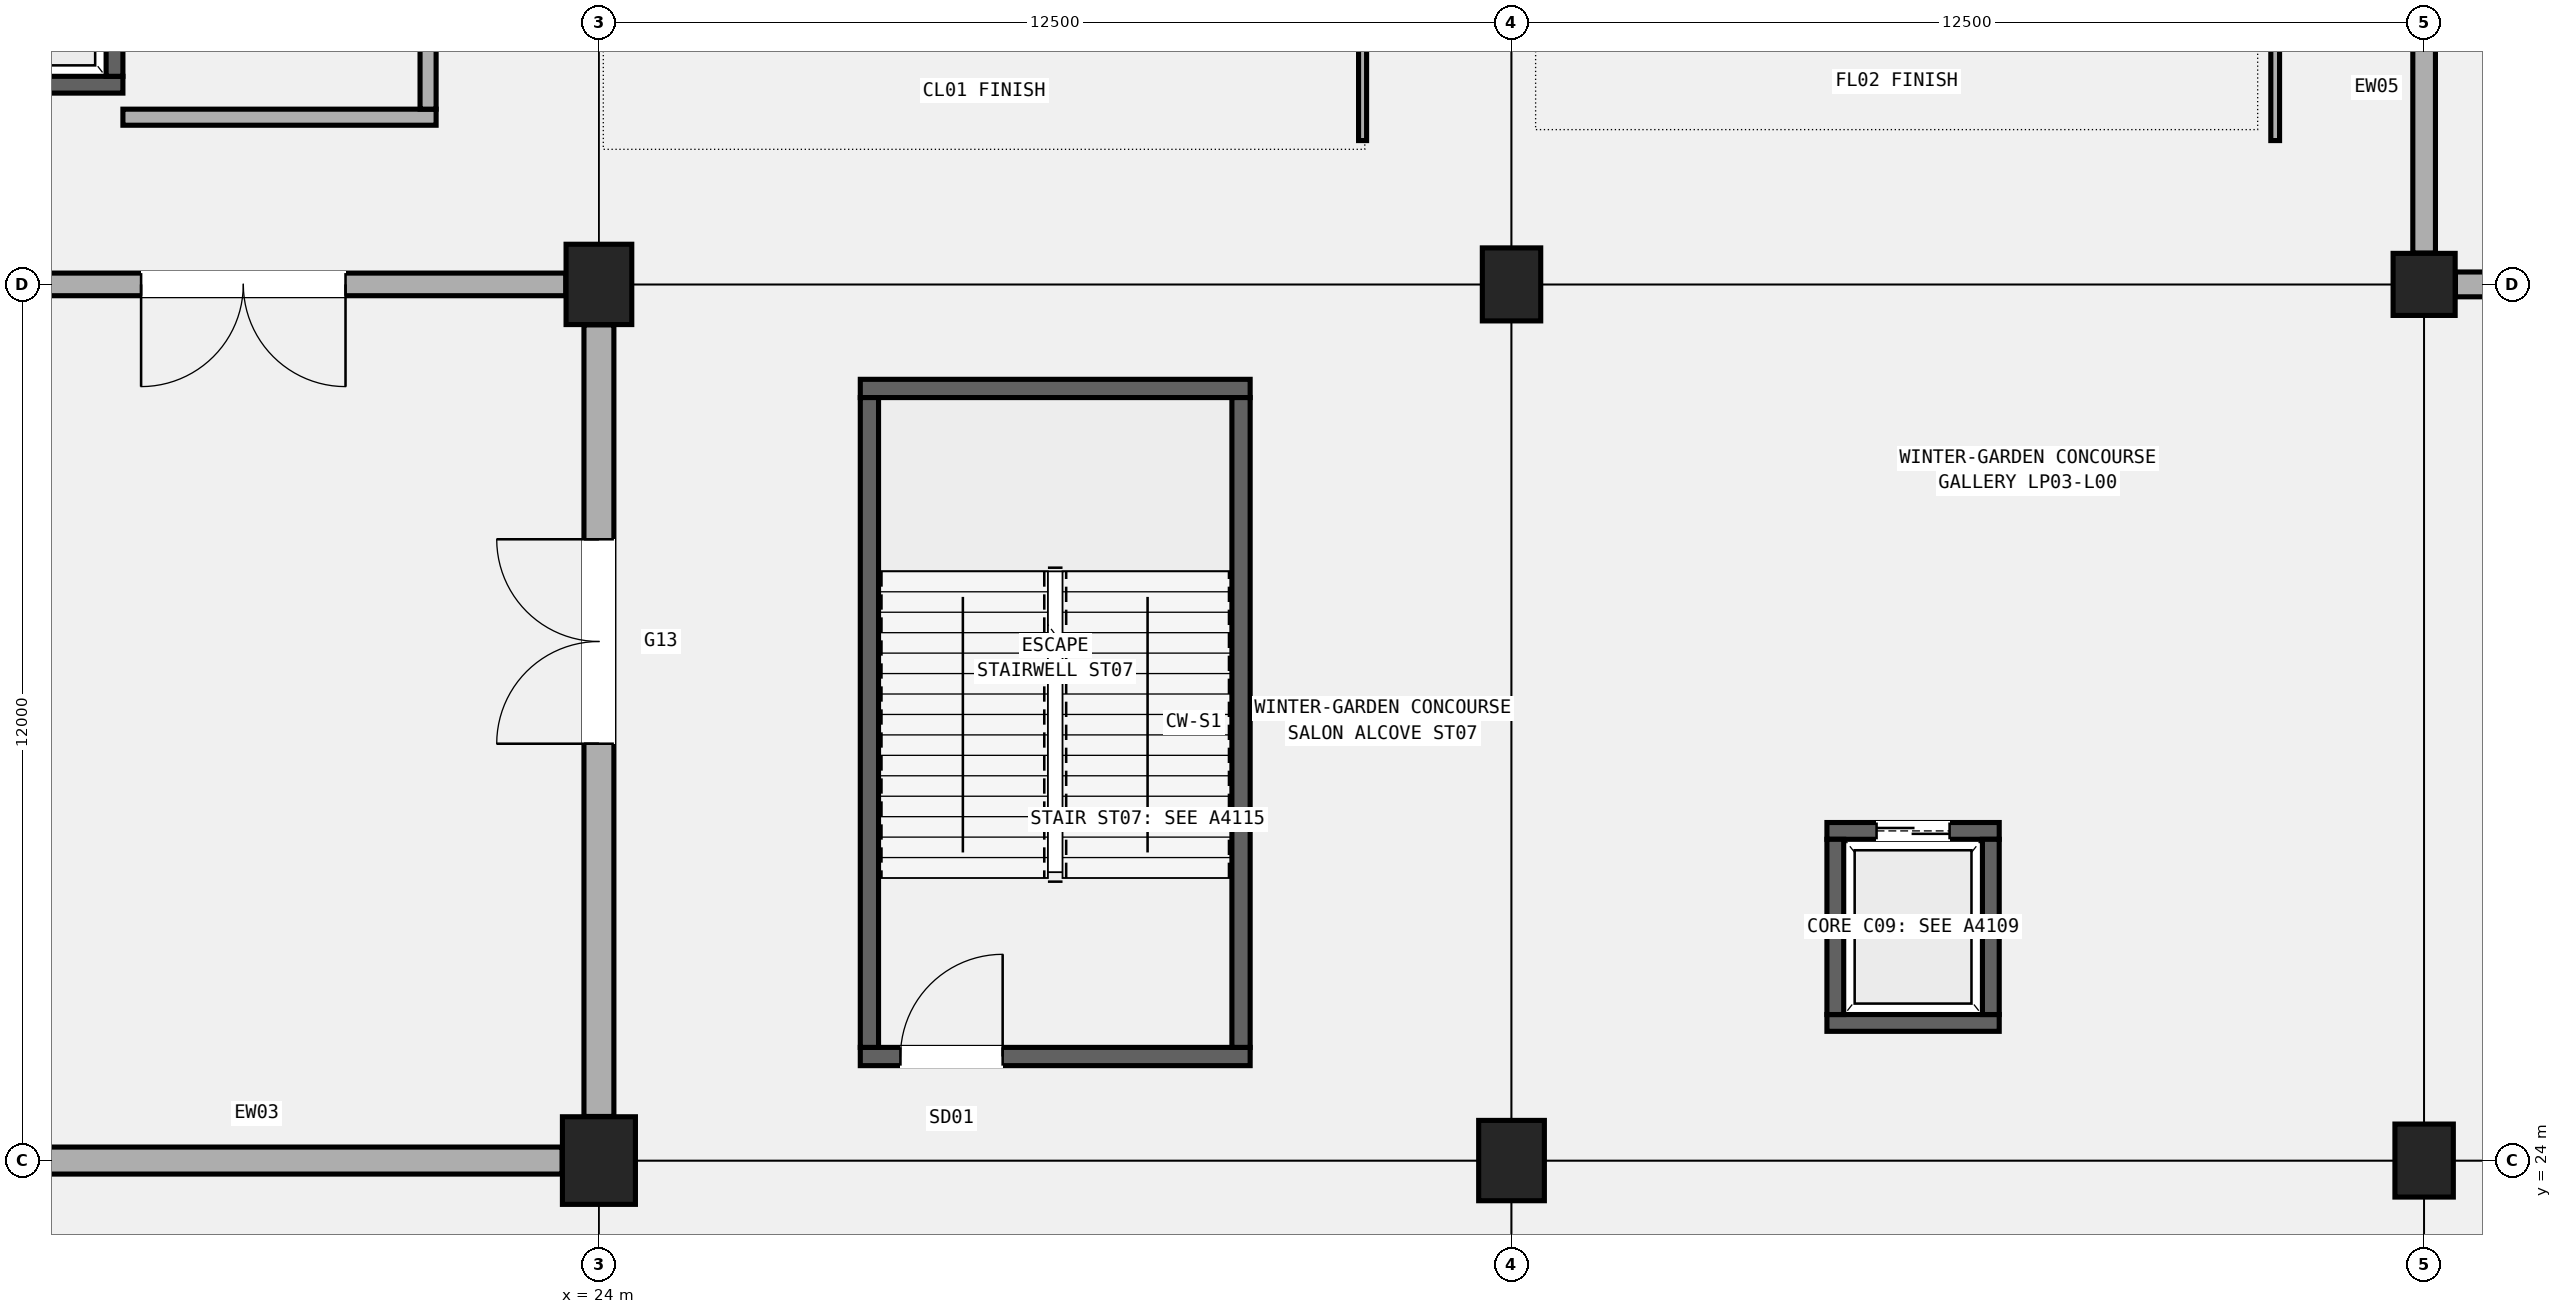
"""IFC4 building model, lengths in metres.
Left out: names, types, materials, properties, quantities, classifications, styles, units other than length and angle.
Written with IfcOpenShell. Run it as: python <this file> out.ifc"""

import sys

from ifc_helpers import new_model, si_unit, direction, frame, frame_2d, origin, origin_2d, place, context, subcontext, project, spatial, rectangle, circle, extrude, element, fill, save


model = new_model("IFC4")
c1 = context("Model", 3, precision=1e-05, world=origin(), true_north=direction((0.0, 1.0)))
c2 = subcontext(c1, "Body", "Model", "MODEL_VIEW")
j1 = project(units=[si_unit("LENGTHUNIT", "METRE"), si_unit("PLANEANGLEUNIT", "RADIAN")], contexts=[c1])
p1 = place(None, origin())
s1 = spatial("IfcSite", under=j1, at=p1, CompositionType="ELEMENT")
p2 = place(p1, origin())
s2 = spatial("IfcBuilding", under=s1, at=p2, CompositionType="ELEMENT")
p3 = place(p2, origin())
s3 = spatial("IfcBuildingStorey", under=s2, at=p3, CompositionType="ELEMENT", Elevation=0.0)
p4 = place(p3, frame((24.0, 24.0, 0.0), z_axis=(0.0, 0.0, 1.0), x_axis=(1.0, 0.0, 0.0)))
e1 = element("IfcColumn", 1, at=p4, inside=s3, PredefinedType="COLUMN", context=c2, shape_type="SweptSolid", body=[
    extrude(rectangle(XDim=1.0, YDim=1.2, at=origin_2d()), origin(), (0.0, 0.0, 1.0), 5.4),
])
for number, where, z_axis, x_axis in (
    (2, (24.0, 36.0, 0.0), (0.0, 0.0, 1.0), (1.0, 0.0, 0.0)),
    (3, (36.5, 24.0, 0.0), (0.0, 0.0, 1.0), (1.0, 0.0, 0.0)),
):
    element("IfcColumn", number, at=place(p3, frame(where, z_axis=z_axis, x_axis=x_axis)), inside=s3, PredefinedType="COLUMN", context=c2, shape_type="SweptSolid", body=[
        extrude(rectangle(XDim=0.9, YDim=1.1, at=origin_2d()), origin(), (0.0, 0.0, 1.0), 5.4),
    ])
for number, where, z_axis, x_axis in (
    (4, (36.5, 36.0, 0.0), (0.0, 0.0, 1.0), (1.0, 0.0, 0.0)),
    (5, (49.0, 24.0, 0.0), (0.0, 0.0, 1.0), (1.0, 0.0, 0.0)),
):
    element("IfcColumn", number, at=place(p3, frame(where, z_axis=z_axis, x_axis=x_axis)), inside=s3, PredefinedType="COLUMN", context=c2, shape_type="SweptSolid", body=[
        extrude(rectangle(XDim=0.8, YDim=1.0, at=origin_2d()), origin(), (0.0, 0.0, 1.0), 5.4),
    ])
p5 = place(p3, frame((49.0, 36.0, 0.0), z_axis=(0.0, 0.0, 1.0), x_axis=(1.0, 0.0, 0.0)))
e6 = element("IfcColumn", 6, at=p5, inside=s3, PredefinedType="COLUMN", context=c2, shape_type="SweptSolid", body=[
    extrude(circle(Radius=0.425, at=origin_2d()), origin(), (0.0, 0.0, 1.0), 5.4),
])
p6 = place(p3, frame((12.429, 24.0, 0.0), z_axis=(0.0, 0.0, 1.0), x_axis=(1.0, 0.0, 0.0)))
e7 = element("IfcWall", 7, at=p6, inside=s3, PredefinedType="SOLIDWALL", context=c2, shape_type="SweptSolid", body=[
    extrude(rectangle(XDim=11.067, YDim=0.37, at=frame_2d((5.534, 0.0))), origin(), (0.0, 0.0, 1.0), 4.34),
])
p7 = place(p6, frame((1.5, 0.0, 0.95)))
e8 = element("IfcOpeningElement", 8, at=p7, cuts=e7, PredefinedType="OPENING", context=c2, shape_type="SweptSolid", body=[
    extrude(rectangle(XDim=0.9, YDim=2.7, at=frame_2d((0.45, 1.35))), frame((0.0, 0.195, 0.0), z_axis=(0.0, -1.0, 0.0), x_axis=(1.0, 0.0, 0.0)), (0.0, 0.0, 1.0), 0.39),
])
p8 = place(p3, frame((12.504, 36.0, 0.0), z_axis=(0.0, 0.0, 1.0), x_axis=(1.0, 0.0, 0.0)))
e9 = element("IfcWall", 9, at=p8, inside=s3, PredefinedType="SOLIDWALL", context=c2, shape_type="SweptSolid", body=[
    extrude(rectangle(XDim=11.042, YDim=0.31, at=frame_2d((5.521, 0.0))), origin(), (0.0, 0.0, 1.0), 4.09),
])
p9 = place(p8, frame((8.025, 0.0, 0.0), z_axis=(0.0, 0.0, 1.0), x_axis=(-1.0, 0.0, 0.0)))
e10 = element("IfcOpeningElement", 10, at=p9, cuts=e9, PredefinedType="OPENING", context=c2, shape_type="SweptSolid", body=[
    extrude(rectangle(XDim=2.8, YDim=2.4, at=frame_2d((1.4, 1.2))), frame((0.0, 0.165, 0.0), z_axis=(0.0, -1.0, 0.0), x_axis=(1.0, 0.0, 0.0)), (0.0, 0.0, 1.0), 0.33),
])
p10 = place(p3, frame((24.0, 24.604, 0.0), z_axis=(0.0, 0.0, 1.0), x_axis=(0.0, 1.0, 0.0)))
e11 = element("IfcWall", 11, at=p10, inside=s3, PredefinedType="SOLIDWALL", context=c2, shape_type="SweptSolid", body=[
    extrude(rectangle(XDim=10.842, YDim=0.41, at=frame_2d((5.421, 0.0))), origin(), (0.0, 0.0, 1.0), 4.34),
])
p11 = place(p10, frame((5.105, 0.0, 0.0)))
e12 = element("IfcOpeningElement", 12, at=p11, cuts=e11, PredefinedType="OPENING", context=c2, shape_type="SweptSolid", body=[
    extrude(rectangle(XDim=2.8, YDim=2.4, at=frame_2d((1.4, 1.2))), frame((0.0, 0.215, 0.0), z_axis=(0.0, -1.0, 0.0), x_axis=(1.0, 0.0, 0.0)), (0.0, 0.0, 1.0), 0.43),
])
p12 = place(p3, frame((49.0, 36.429, 0.0), z_axis=(0.0, 0.0, 1.0), x_axis=(0.0, 1.0, 0.0)))
e13 = element("IfcWall", 13, at=p12, inside=s3, PredefinedType="SOLIDWALL", context=c2, shape_type="SweptSolid", body=[
    extrude(rectangle(XDim=10.967, YDim=0.31, at=frame_2d((5.483, 0.0))), origin(), (0.0, 0.0, 1.0), 4.34),
])
p13 = place(p12, frame((7.442, 0.0, 0.0), z_axis=(0.0, 0.0, 1.0), x_axis=(-1.0, 0.0, 0.0)))
e14 = element("IfcOpeningElement", 14, at=p13, cuts=e13, PredefinedType="OPENING", context=c2, shape_type="SweptSolid", body=[
    extrude(rectangle(XDim=2.6, YDim=2.5, at=frame_2d((1.3, 1.25))), frame((0.0, 0.165, 0.0), z_axis=(0.0, -1.0, 0.0), x_axis=(1.0, 0.0, 0.0)), (0.0, 0.0, 1.0), 0.33),
])
p14 = place(p3, frame((49.429, 36.0, 0.0), z_axis=(0.0, 0.0, 1.0), x_axis=(1.0, 0.0, 0.0)))
e15 = element("IfcWall", 15, at=p14, inside=s3, PredefinedType="SOLIDWALL", context=c2, shape_type="SweptSolid", body=[
    extrude(rectangle(XDim=11.567, YDim=0.34, at=frame_2d((5.784, 0.0))), origin(), (0.0, 0.0, 1.0), 4.34),
])
p15 = place(p14, frame((5.177, 0.0, 0.0)))
e16 = element("IfcOpeningElement", 16, at=p15, cuts=e15, PredefinedType="OPENING", context=c2, shape_type="SweptSolid", body=[
    extrude(rectangle(XDim=2.6, YDim=2.5, at=frame_2d((1.3, 1.25))), frame((0.0, 0.18, 0.0), z_axis=(0.0, -1.0, 0.0), x_axis=(1.0, 0.0, 0.0)), (0.0, 0.0, 1.0), 0.36),
])
p16 = place(p3, frame((27.58, 25.425, 0.0), z_axis=(0.0, 0.0, 1.0), x_axis=(1.0, 0.0, 0.0)))
e17 = element("IfcWall", 17, at=p16, inside=s3, PredefinedType="SHEAR", context=c2, shape_type="SweptSolid", body=[
    extrude(rectangle(XDim=5.34, YDim=0.25, at=frame_2d((2.67, 0.0))), origin(), (0.0, 0.0, 1.0), 5.14),
])
p17 = place(p16, frame((0.55, 0.0, 0.0)))
e18 = element("IfcOpeningElement", 18, at=p17, cuts=e17, PredefinedType="OPENING", context=c2, shape_type="SweptSolid", body=[
    extrude(rectangle(XDim=1.4, YDim=2.15, at=frame_2d((0.7, 1.075))), frame((0.0, 0.135, 0.0), z_axis=(0.0, -1.0, 0.0), x_axis=(1.0, 0.0, 0.0)), (0.0, 0.0, 1.0), 0.27),
])
p18 = place(p3, frame((27.58, 34.575, 0.0), z_axis=(0.0, 0.0, 1.0), x_axis=(1.0, 0.0, 0.0)))
e19 = element("IfcWall", 19, at=p18, inside=s3, PredefinedType="SHEAR", context=c2, shape_type="SweptSolid", body=[
    extrude(rectangle(XDim=5.34, YDim=0.25, at=frame_2d((2.67, 0.0))), origin(), (0.0, 0.0, 1.0), 5.14),
])
for number, where, z_axis, x_axis in (
    (20, (27.705, 25.55, 0.0), (0.0, 0.0, 1.0), (0.0, 1.0, 0.0)),
    (21, (32.795, 25.55, 0.0), (0.0, 0.0, 1.0), (0.0, 1.0, 0.0)),
):
    element("IfcWall", number, at=place(p3, frame(where, z_axis=z_axis, x_axis=x_axis)), inside=s3, PredefinedType="SHEAR", context=c2, shape_type="SweptSolid", body=[
        extrude(rectangle(XDim=8.9, YDim=0.25, at=frame_2d((4.45, 0.0))), origin(), (0.0, 0.0, 1.0), 5.14),
    ])
p19 = place(p3, frame((14.92, 38.735, 0.0), z_axis=(0.0, 0.0, 1.0), x_axis=(1.0, 0.0, 0.0)))
e22 = element("IfcWall", 22, at=p19, inside=s3, PredefinedType="SHEAR", context=c2, shape_type="SweptSolid", body=[
    extrude(rectangle(XDim=2.56, YDim=0.23, at=frame_2d((1.28, 0.0))), origin(), (0.0, 0.0, 1.0), 5.14),
])
p20 = place(p3, frame((17.365, 38.85, 0.0), z_axis=(0.0, 0.0, 1.0), x_axis=(0.0, 1.0, 0.0)))
e23 = element("IfcWall", 23, at=p20, inside=s3, PredefinedType="SHEAR", context=c2, shape_type="SweptSolid", body=[
    extrude(rectangle(XDim=2.7, YDim=0.23, at=frame_2d((1.35, 0.0))), origin(), (0.0, 0.0, 1.0), 5.14),
])
p21 = place(p20, frame((0.8, 0.0, 0.0)))
e24 = element("IfcOpeningElement", 24, at=p21, cuts=e23, PredefinedType="OPENING", context=c2, shape_type="SweptSolid", body=[
    extrude(rectangle(XDim=1.1, YDim=2.15, at=frame_2d((0.55, 1.075))), frame((0.0, 0.125, 0.0), z_axis=(0.0, -1.0, 0.0), x_axis=(1.0, 0.0, 0.0)), (0.0, 0.0, 1.0), 0.25),
])
p22 = place(p3, frame((17.48, 38.29, 0.0), z_axis=(0.0, 0.0, 1.0), x_axis=(1.0, 0.0, 0.0)))
e25 = element("IfcWall", 25, at=p22, inside=s3, PredefinedType="SOLIDWALL", context=c2, shape_type="SweptSolid", body=[
    extrude(rectangle(XDim=4.29, YDim=0.22, at=frame_2d((2.145, 0.0))), origin(), (0.0, 0.0, 1.0), 4.52),
])
p23 = place(p3, frame((21.66, 38.4, 0.0), z_axis=(0.0, 0.0, 1.0), x_axis=(0.0, 1.0, 0.0)))
e26 = element("IfcWall", 26, at=p23, inside=s3, PredefinedType="SOLIDWALL", context=c2, shape_type="SweptSolid", body=[
    extrude(rectangle(XDim=3.6, YDim=0.22, at=frame_2d((1.8, 0.0))), origin(), (0.0, 0.0, 1.0), 4.52),
])
p24 = place(p23, frame((1.15, 0.0, 0.0)))
e27 = element("IfcOpeningElement", 27, at=p24, cuts=e26, PredefinedType="OPENING", context=c2, shape_type="SweptSolid", body=[
    extrude(rectangle(XDim=1.3, YDim=2.15, at=frame_2d((0.65, 1.075))), frame((0.0, 0.12, 0.0), z_axis=(0.0, -1.0, 0.0), x_axis=(1.0, 0.0, 0.0)), (0.0, 0.0, 1.0), 0.24),
])
p25 = place(p3, frame((40.82, 25.885, 0.0), z_axis=(0.0, 0.0, 1.0), x_axis=(1.0, 0.0, 0.0)))
e28 = element("IfcWall", 28, at=p25, inside=s3, PredefinedType="SHEAR", context=c2, shape_type="SweptSolid", body=[
    extrude(rectangle(XDim=2.36, YDim=0.23, at=frame_2d((1.18, 0.0))), origin(), (0.0, 0.0, 1.0), 5.14),
])
p26 = place(p3, frame((40.82, 28.515, 0.0), z_axis=(0.0, 0.0, 1.0), x_axis=(1.0, 0.0, 0.0)))
e29 = element("IfcWall", 29, at=p26, inside=s3, PredefinedType="SHEAR", context=c2, shape_type="SweptSolid", body=[
    extrude(rectangle(XDim=2.36, YDim=0.23, at=frame_2d((1.18, 0.0))), origin(), (0.0, 0.0, 1.0), 5.14),
])
p27 = place(p26, frame((0.68, 0.0, 0.0)))
e30 = element("IfcOpeningElement", 30, at=p27, cuts=e29, PredefinedType="OPENING", context=c2, shape_type="SweptSolid", body=[
    extrude(rectangle(XDim=1.0, YDim=2.15, at=frame_2d((0.5, 1.075))), frame((0.0, 0.125, 0.0), z_axis=(0.0, -1.0, 0.0), x_axis=(1.0, 0.0, 0.0)), (0.0, 0.0, 1.0), 0.25),
])
for number, where, z_axis, x_axis in (
    (31, (40.935, 26.0, 0.0), (0.0, 0.0, 1.0), (0.0, 1.0, 0.0)),
    (32, (43.065, 26.0, 0.0), (0.0, 0.0, 1.0), (0.0, 1.0, 0.0)),
):
    element("IfcWall", number, at=place(p3, frame(where, z_axis=z_axis, x_axis=x_axis)), inside=s3, PredefinedType="SHEAR", context=c2, shape_type="SweptSolid", body=[
        extrude(rectangle(XDim=2.4, YDim=0.23, at=frame_2d((1.2, 0.0))), origin(), (0.0, 0.0, 1.0), 5.14),
    ])
p28 = place(p3, frame((34.46, 37.97, 0.0), z_axis=(0.0, 0.0, 1.0), x_axis=(0.0, 1.0, 0.0)))
e33 = element("IfcWall", 33, at=p28, inside=s3, PredefinedType="PARTITIONING", context=c2, shape_type="SweptSolid", body=[
    extrude(rectangle(XDim=9.87, YDim=0.11, at=frame_2d((4.935, 0.0))), origin(), (0.0, 0.0, 1.0), 4.52),
])
p29 = place(p28, frame((4.135, 0.0, 0.0)))
e34 = element("IfcOpeningElement", 34, at=p29, cuts=e33, PredefinedType="OPENING", context=c2, shape_type="SweptSolid", body=[
    extrude(rectangle(XDim=1.6, YDim=2.3, at=frame_2d((0.8, 1.15))), frame((0.0, 0.065, 0.0), z_axis=(0.0, -1.0, 0.0), x_axis=(1.0, 0.0, 0.0)), (0.0, 0.0, 1.0), 0.13),
])
p30 = place(p3, frame((46.96, 37.97, 0.0), z_axis=(0.0, 0.0, 1.0), x_axis=(0.0, 1.0, 0.0)))
e35 = element("IfcWall", 35, at=p30, inside=s3, PredefinedType="PARTITIONING", context=c2, shape_type="SweptSolid", body=[
    extrude(rectangle(XDim=9.87, YDim=0.12, at=frame_2d((4.935, 0.0))), origin(), (0.0, 0.0, 1.0), 4.52),
])
p31 = place(p30, frame((1.793, 0.0, 0.0)))
e36 = element("IfcOpeningElement", 36, at=p31, cuts=e35, PredefinedType="OPENING", context=c2, shape_type="SweptSolid", body=[
    extrude(rectangle(XDim=1.12, YDim=2.18, at=frame_2d((0.56, 1.09))), frame((0.0, 0.07, 0.0), z_axis=(0.0, -1.0, 0.0), x_axis=(1.0, 0.0, 0.0)), (0.0, 0.0, 1.0), 0.14),
])
p32 = place(p30, frame((6.793, 0.0, 0.0)))
e37 = element("IfcOpeningElement", 37, at=p32, cuts=e35, PredefinedType="OPENING", context=c2, shape_type="SweptSolid", body=[
    extrude(rectangle(XDim=1.15, YDim=2.15, at=frame_2d((0.575, 1.075))), frame((0.0, 0.07, 0.0), z_axis=(0.0, -1.0, 0.0), x_axis=(1.0, 0.0, 0.0)), (0.0, 0.0, 1.0), 0.14),
])
p33 = place(p9, origin())
e38 = element("IfcDoor", 38, at=p33, inside=s3, OperationType="DOUBLE_DOOR_SINGLE_SWING", PredefinedType="DOOR", context=c2, shape_type="SweptSolid", body=[
    extrude(rectangle(XDim=2.8, YDim=2.4, at=frame_2d((1.4, 1.2))), frame((0.0, 0.025, 0.0), z_axis=(0.0, -1.0, 0.0), x_axis=(1.0, 0.0, 0.0)), (0.0, 0.0, 1.0), 0.05),
])
fill(e10, e38)
p34 = place(p11, origin())
e39 = element("IfcDoor", 39, at=p34, inside=s3, OperationType="DOUBLE_DOOR_SINGLE_SWING", PredefinedType="DOOR", context=c2, shape_type="SweptSolid", body=[
    extrude(rectangle(XDim=2.8, YDim=2.4, at=frame_2d((1.4, 1.2))), frame((0.0, 0.025, 0.0), z_axis=(0.0, -1.0, 0.0), x_axis=(1.0, 0.0, 0.0)), (0.0, 0.0, 1.0), 0.05),
])
fill(e12, e39)
p35 = place(p17, origin())
e40 = element("IfcDoor", 40, at=p35, inside=s3, OperationType="SINGLE_SWING_RIGHT", PredefinedType="DOOR", context=c2, shape_type="SweptSolid", body=[
    extrude(rectangle(XDim=1.4, YDim=2.15, at=frame_2d((0.7, 1.075))), frame((0.0, 0.025, 0.0), z_axis=(0.0, -1.0, 0.0), x_axis=(1.0, 0.0, 0.0)), (0.0, 0.0, 1.0), 0.05),
])
fill(e18, e40)
p36 = place(p27, origin())
e41 = element("IfcDoor", 41, at=p36, inside=s3, OperationType="DOUBLE_DOOR_SLIDING", PredefinedType="DOOR", context=c2, shape_type="SweptSolid", body=[
    extrude(rectangle(XDim=1.0, YDim=2.15, at=frame_2d((0.5, 1.075))), frame((0.0, 0.025, 0.0), z_axis=(0.0, -1.0, 0.0), x_axis=(1.0, 0.0, 0.0)), (0.0, 0.0, 1.0), 0.05),
])
fill(e30, e41)
save(model, sys.argv[1])
